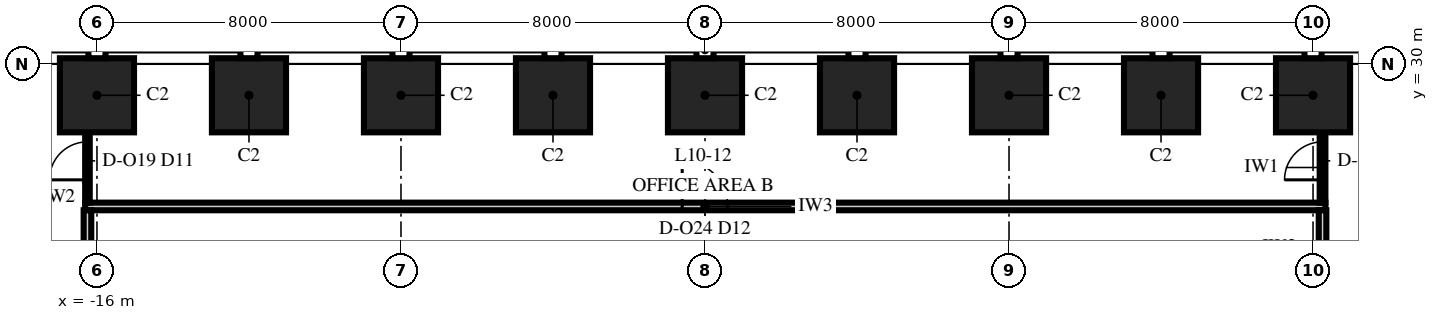
"""IFC4 building model, lengths in metres.
Left out: names, types, materials, properties, quantities, classifications, styles, units other than length and angle.
Written with IfcOpenShell. Run it as: python <this file> out.ifc"""

import sys

from ifc_helpers import new_model, si_unit, direction, frame, frame_2d, origin, origin_2d, place, context, subcontext, project, spatial, rectangle, extrude, element, fill, save


model = new_model("IFC4")
c1 = context("Model", 3, precision=1e-05, world=origin(), true_north=direction((0.0, 1.0)))
c2 = subcontext(c1, "Body", "Model", "MODEL_VIEW")
j1 = project(units=[si_unit("LENGTHUNIT", "METRE"), si_unit("PLANEANGLEUNIT", "RADIAN")], contexts=[c1])
p1 = place(None, origin())
s1 = spatial("IfcSite", under=j1, at=p1, CompositionType="ELEMENT")
p2 = place(p1, origin())
s2 = spatial("IfcBuilding", under=s1, at=p2, CompositionType="ELEMENT")
p3 = place(p2, frame((0.0, 0.0, 52.0)))
s3 = spatial("IfcBuildingStorey", under=s2, at=p3, CompositionType="ELEMENT", Elevation=52.0)
for number, where, z_axis, x_axis in (
    (1, (16.0, 29.175, 0.0), (0.0, 0.0, 1.0), (-1.0, 0.0, 0.0)),
    (2, (12.0, 29.175, 0.0), (0.0, 0.0, 1.0), (-1.0, 0.0, 0.0)),
    (3, (8.0, 29.175, 0.0), (0.0, 0.0, 1.0), (-1.0, 0.0, 0.0)),
    (4, (4.0, 29.175, 0.0), (0.0, 0.0, 1.0), (-1.0, 0.0, 0.0)),
    (5, (0.0, 29.175, 0.0), (0.0, 0.0, 1.0), (-1.0, 0.0, 0.0)),
    (6, (-4.0, 29.175, 0.0), (0.0, 0.0, 1.0), (-1.0, 0.0, 0.0)),
    (7, (-8.0, 29.175, 0.0), (0.0, 0.0, 1.0), (-1.0, 0.0, 0.0)),
    (8, (-12.0, 29.175, 0.0), (0.0, 0.0, 1.0), (-1.0, 0.0, 0.0)),
    (9, (-16.0, 29.175, 0.0), (0.0, 0.0, 1.0), (-1.0, 0.0, 0.0)),
):
    element("IfcColumn", number, at=place(p3, frame(where, z_axis=z_axis, x_axis=x_axis)), inside=s3, PredefinedType="COLUMN", context=c2, shape_type="SweptSolid", body=[
        extrude(rectangle(XDim=1.95, YDim=1.95, at=origin_2d()), origin(), (0.0, 0.0, 1.0), 4.0),
    ])
p4 = place(p3, frame((-16.31, 26.25, 0.0), z_axis=(0.0, 0.0, 1.0), x_axis=(1.0, 0.0, 0.0)))
e10 = element("IfcWall", 10, at=p4, inside=s3, PredefinedType="PARTITIONING", context=c2, shape_type="SweptSolid", body=[
    extrude(rectangle(XDim=32.635, YDim=0.2, at=frame_2d((16.317, 0.0))), origin(), (0.0, 0.0, 1.0), 3.4),
])
p5 = place(p4, frame((15.71, 0.0, 0.0)))
e11 = element("IfcOpeningElement", 11, at=p5, cuts=e10, PredefinedType="OPENING", context=c2, shape_type="SweptSolid", body=[
    extrude(rectangle(XDim=1.2, YDim=2.4, at=frame_2d((0.6, 1.2))), frame((0.0, 0.115, 0.0), z_axis=(0.0, -1.0, 0.0), x_axis=(1.0, 0.0, 0.0)), (0.0, 0.0, 1.0), 0.23),
])
p6 = place(p3, frame((-16.25, 3.85, 0.0), z_axis=(0.0, 0.0, 1.0), x_axis=(0.0, 1.0, 0.0)))
e12 = element("IfcWall", 12, at=p6, inside=s3, PredefinedType="PARTITIONING", context=c2, shape_type="SweptSolid", body=[
    extrude(rectangle(XDim=22.3, YDim=0.2, at=frame_2d((11.15, 0.0))), origin(), (0.0, 0.0, 1.0), 2.842),
])
p7 = place(p6, frame((4.55, 0.0, 0.0)))
e13 = element("IfcOpeningElement", 13, at=p7, cuts=e12, PredefinedType="OPENING", context=c2, shape_type="SweptSolid", body=[
    extrude(rectangle(XDim=1.2, YDim=2.4, at=frame_2d((0.6, 1.2))), frame((0.0, 0.115, 0.0), z_axis=(0.0, -1.0, 0.0), x_axis=(1.0, 0.0, 0.0)), (0.0, 0.0, 1.0), 0.23),
])
p8 = place(p3, frame((-16.25, 26.35, 0.0), z_axis=(0.0, 0.0, 1.0), x_axis=(0.0, 1.0, 0.0)))
e14 = element("IfcWall", 14, at=p8, inside=s3, PredefinedType="PARTITIONING", context=c2, shape_type="SweptSolid", body=[
    extrude(rectangle(XDim=1.85, YDim=0.12, at=frame_2d((0.925, 0.0))), origin(), (0.0, 0.0, 1.0), 3.85),
])
p9 = place(p8, frame((0.6, 0.0, 0.0)))
e15 = element("IfcOpeningElement", 15, at=p9, cuts=e14, PredefinedType="OPENING", context=c2, shape_type="SweptSolid", body=[
    extrude(rectangle(XDim=1.0, YDim=2.4, at=frame_2d((0.5, 1.2))), frame((0.0, 0.075, 0.0), z_axis=(0.0, -1.0, 0.0), x_axis=(1.0, 0.0, 0.0)), (0.0, 0.0, 1.0), 0.15),
])
p10 = place(p3, frame((16.25, 21.94, 0.0), z_axis=(0.0, 0.0, 1.0), x_axis=(0.0, 1.0, 0.0)))
e16 = element("IfcWall", 16, at=p10, inside=s3, PredefinedType="PARTITIONING", context=c2, shape_type="SweptSolid", body=[
    extrude(rectangle(XDim=4.21, YDim=0.2, at=frame_2d((2.105, 0.0))), origin(), (0.0, 0.0, 1.0), 3.4),
])
p11 = place(p3, frame((16.25, 26.35, 0.0), z_axis=(0.0, 0.0, 1.0), x_axis=(0.0, 1.0, 0.0)))
e17 = element("IfcWall", 17, at=p11, inside=s3, PredefinedType="PARTITIONING", context=c2, shape_type="SweptSolid", body=[
    extrude(rectangle(XDim=1.85, YDim=0.15, at=frame_2d((0.925, 0.0))), origin(), (0.0, 0.0, 1.0), 3.85),
])
p12 = place(p11, frame((0.6, 0.0, 0.0)))
e18 = element("IfcOpeningElement", 18, at=p12, cuts=e17, PredefinedType="OPENING", context=c2, shape_type="SweptSolid", body=[
    extrude(rectangle(XDim=1.0, YDim=2.3, at=frame_2d((0.5, 1.15))), frame((0.0, 0.09, 0.0), z_axis=(0.0, -1.0, 0.0), x_axis=(1.0, 0.0, 0.0)), (0.0, 0.0, 1.0), 0.18),
])
p13 = place(p9, origin())
e19 = element("IfcDoor", 19, at=p13, inside=s3, OperationType="SINGLE_SWING_RIGHT", PredefinedType="DOOR", context=c2, shape_type="SweptSolid", body=[
    extrude(rectangle(XDim=1.0, YDim=2.4, at=frame_2d((0.5, 1.2))), frame((0.0, 0.06, 0.0), z_axis=(0.0, -1.0, 0.0), x_axis=(1.0, 0.0, 0.0)), (0.0, 0.0, 1.0), 0.12),
])
fill(e15, e19)
p14 = place(p12, origin())
e20 = element("IfcDoor", 20, at=p14, inside=s3, OperationType="SINGLE_SWING_LEFT", PredefinedType="DOOR", context=c2, shape_type="SweptSolid", body=[
    extrude(rectangle(XDim=1.0, YDim=2.3, at=frame_2d((0.5, 1.15))), frame((0.0, 0.075, 0.0), z_axis=(0.0, -1.0, 0.0), x_axis=(1.0, 0.0, 0.0)), (0.0, 0.0, 1.0), 0.149),
])
fill(e18, e20)
p15 = place(p5, origin())
e21 = element("IfcDoor", 21, at=p15, inside=s3, OperationType="SINGLE_SWING_LEFT", PredefinedType="DOOR", context=c2, shape_type="SweptSolid", body=[
    extrude(rectangle(XDim=1.2, YDim=2.4, at=frame_2d((0.6, 1.2))), frame((0.0, 0.1, 0.0), z_axis=(0.0, -1.0, 0.0), x_axis=(1.0, 0.0, 0.0)), (0.0, 0.0, 1.0), 0.199),
])
fill(e11, e21)
save(model, sys.argv[1])
